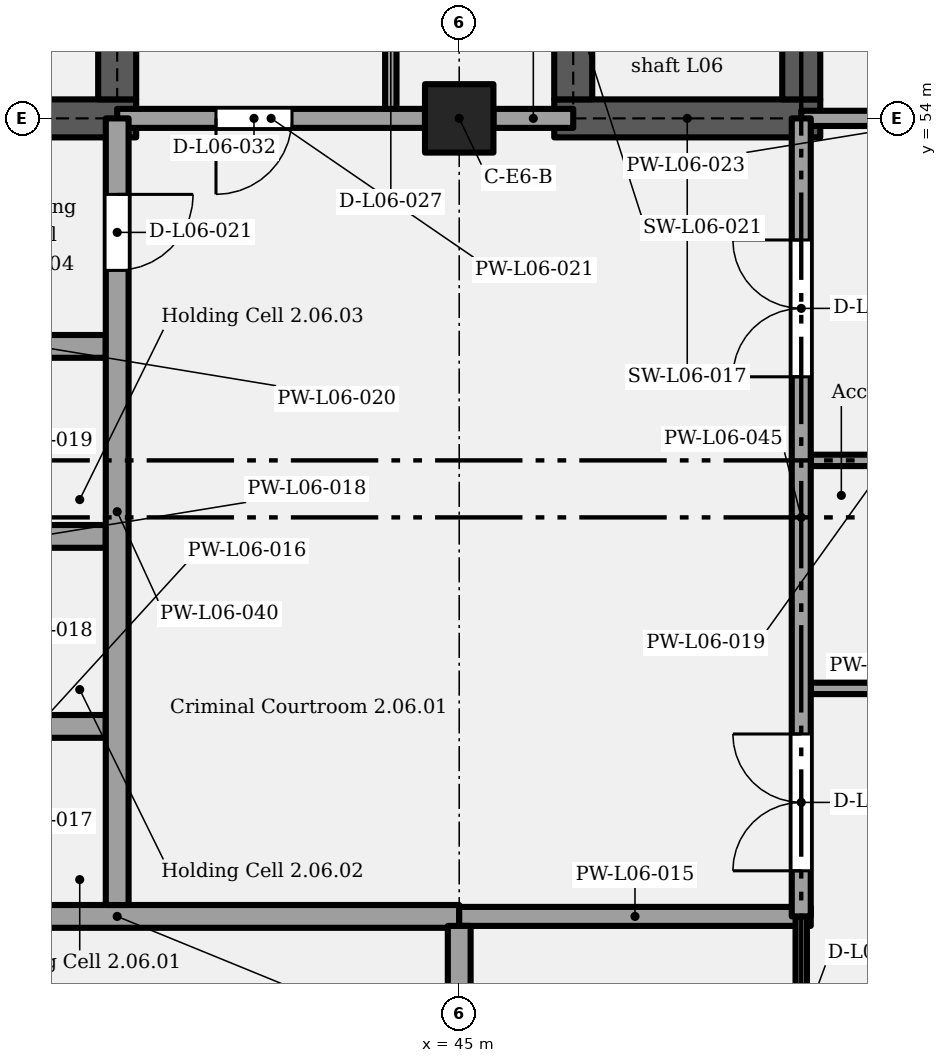
"""IFC4 building model, lengths in metres.
Left out: names, types, materials, properties, quantities, classifications, styles, units other than length and angle.
Written with IfcOpenShell. Run it as: python <this file> out.ifc"""

import sys

from ifc_helpers import new_model, si_unit, direction, frame, frame_2d, origin, origin_2d, place, context, subcontext, project, spatial, rectangle, extrude, element, fill, save


model = new_model("IFC4")
c1 = context("Model", 3, precision=1e-05, world=origin(), true_north=direction((0.0, 1.0)))
c2 = subcontext(c1, "Body", "Model", "MODEL_VIEW")
j1 = project(units=[si_unit("LENGTHUNIT", "METRE"), si_unit("PLANEANGLEUNIT", "RADIAN")], contexts=[c1])
p1 = place(None, origin())
s1 = spatial("IfcSite", under=j1, at=p1, CompositionType="ELEMENT")
p2 = place(p1, origin())
s2 = spatial("IfcBuilding", under=s1, at=p2, CompositionType="ELEMENT")
p3 = place(p2, frame((0.0, 0.0, 33.6)))
s3 = spatial("IfcBuildingStorey", under=s2, at=p3, CompositionType="ELEMENT", Elevation=33.6)
p4 = place(p3, frame((45.0, 54.0, 0.0), z_axis=(0.0, 0.0, 1.0), x_axis=(1.0, 0.0, 0.0)))
e1 = element("IfcColumn", 1, at=p4, inside=s3, PredefinedType="COLUMN", context=c2, shape_type="SweptSolid", body=[
    extrude(rectangle(XDim=0.9, YDim=0.9, at=origin_2d()), origin(), (0.0, 0.0, 1.0), 5.4),
])
p5 = place(p3, frame((38.15, 54.0, 0.0), z_axis=(0.0, 0.0, 1.0), x_axis=(1.0, 0.0, 0.0)))
e2 = element("IfcWall", 2, at=p5, inside=s3, PredefinedType="SHEAR", context=c2, shape_type="SweptSolid", body=[
    extrude(rectangle(XDim=2.6, YDim=0.5, at=frame_2d((1.3, 0.0))), origin(), (0.0, 0.0, 1.0), 5.15),
])
p6 = place(p3, frame((46.25, 54.0, 0.0), z_axis=(0.0, 0.0, 1.0), x_axis=(1.0, 0.0, 0.0)))
e3 = element("IfcWall", 3, at=p6, inside=s3, PredefinedType="SHEAR", context=c2, shape_type="SweptSolid", body=[
    extrude(rectangle(XDim=3.5, YDim=0.5, at=frame_2d((1.75, 0.0))), origin(), (0.0, 0.0, 1.0), 5.15),
])
p7 = place(p3, frame((40.5, 54.25, 0.0), z_axis=(0.0, 0.0, 1.0), x_axis=(0.0, 1.0, 0.0)))
e4 = element("IfcWall", 4, at=p7, inside=s3, PredefinedType="SHEAR", context=c2, shape_type="SweptSolid", body=[
    extrude(rectangle(XDim=11.5, YDim=0.5, at=frame_2d((5.75, 0.0))), origin(), (0.0, 0.0, 1.0), 5.15),
])
p8 = place(p3, frame((46.5, 54.25, 0.0), z_axis=(0.0, 0.0, 1.0), x_axis=(0.0, 1.0, 0.0)))
e5 = element("IfcWall", 5, at=p8, inside=s3, PredefinedType="SHEAR", context=c2, shape_type="SweptSolid", body=[
    extrude(rectangle(XDim=2.5, YDim=0.5, at=frame_2d((1.25, 0.0))), origin(), (0.0, 0.0, 1.0), 5.15),
])
p9 = place(p3, frame((49.5, 54.25, 0.0), z_axis=(0.0, 0.0, 1.0), x_axis=(0.0, 1.0, 0.0)))
e6 = element("IfcWall", 6, at=p9, inside=s3, PredefinedType="SHEAR", context=c2, shape_type="SweptSolid", body=[
    extrude(rectangle(XDim=11.5, YDim=0.5, at=frame_2d((5.75, 0.0))), origin(), (0.0, 0.0, 1.0), 5.15),
])
p10 = place(p9, frame((0.7, 0.0, 0.0)))
e7 = element("IfcOpeningElement", 7, at=p10, cuts=e6, PredefinedType="OPENING", context=c2, shape_type="SweptSolid", body=[
    extrude(rectangle(XDim=1.1, YDim=2.1, at=frame_2d((0.55, 1.05))), frame((0.0, 0.26, 0.0), z_axis=(0.0, -1.0, 0.0), x_axis=(1.0, 0.0, 0.0)), (0.0, 0.0, 1.0), 0.52),
])
p11 = place(p9, frame((4.35, 0.0, 0.0), z_axis=(0.0, 0.0, 1.0), x_axis=(-1.0, 0.0, 0.0)))
e8 = element("IfcOpeningElement", 8, at=p11, cuts=e6, PredefinedType="OPENING", context=c2, shape_type="SweptSolid", body=[
    extrude(rectangle(XDim=1.2, YDim=2.1, at=frame_2d((0.6, 1.05))), frame((0.0, 0.26, 0.0), z_axis=(0.0, -1.0, 0.0), x_axis=(1.0, 0.0, 0.0)), (0.0, 0.0, 1.0), 0.52),
])
p12 = place(p3, frame((36.0, 43.5, 0.0), z_axis=(0.0, 0.0, 1.0), x_axis=(1.0, 0.0, 0.0)))
e9 = element("IfcWall", 9, at=p12, inside=s3, PredefinedType="PARTITIONING", context=c2, shape_type="SweptSolid", body=[
    extrude(rectangle(XDim=9.0, YDim=0.3, at=frame_2d((4.5, 0.0))), origin(), (0.0, 0.0, 1.0), 5.15),
])
p13 = place(p12, frame((1.35, 0.0, 0.0), z_axis=(0.0, 0.0, 1.0), x_axis=(-1.0, 0.0, 0.0)))
e10 = element("IfcOpeningElement", 10, at=p13, cuts=e9, PredefinedType="OPENING", context=c2, shape_type="SweptSolid", body=[
    extrude(rectangle(XDim=0.9, YDim=2.1, at=frame_2d((0.45, 1.05))), frame((0.0, 0.16, 0.0), z_axis=(0.0, -1.0, 0.0), x_axis=(1.0, 0.0, 0.0)), (0.0, 0.0, 1.0), 0.32),
])
p14 = place(p3, frame((45.0, 43.5, 0.0), z_axis=(0.0, 0.0, 1.0), x_axis=(1.0, 0.0, 0.0)))
e11 = element("IfcWall", 11, at=p14, inside=s3, PredefinedType="PARTITIONING", context=c2, shape_type="SweptSolid", body=[
    extrude(rectangle(XDim=4.625, YDim=0.25, at=frame_2d((2.312, 0.0))), origin(), (0.0, 0.0, 1.0), 5.15),
])
p15 = place(p3, frame((38.55, 46.0, 0.0), z_axis=(0.0, 0.0, 1.0), x_axis=(1.0, 0.0, 0.0)))
e12 = element("IfcWall", 12, at=p15, inside=s3, PredefinedType="PARTITIONING", context=c2, shape_type="SweptSolid", body=[
    extrude(rectangle(XDim=1.8, YDim=0.3, at=frame_2d((0.9, 0.0))), origin(), (0.0, 0.0, 1.0), 5.15),
])
p16 = place(p3, frame((49.625, 46.5, 0.0), z_axis=(0.0, 0.0, 1.0), x_axis=(1.0, 0.0, 0.0)))
e13 = element("IfcWall", 13, at=p16, inside=s3, PredefinedType="PARTITIONING", context=c2, shape_type="SweptSolid", body=[
    extrude(rectangle(XDim=2.05, YDim=0.15, at=frame_2d((1.025, 0.0))), origin(), (0.0, 0.0, 1.0), 5.15),
])
p17 = place(p3, frame((38.55, 48.5, 0.0), z_axis=(0.0, 0.0, 1.0), x_axis=(1.0, 0.0, 0.0)))
e14 = element("IfcWall", 14, at=p17, inside=s3, PredefinedType="PARTITIONING", context=c2, shape_type="SweptSolid", body=[
    extrude(rectangle(XDim=1.8, YDim=0.3, at=frame_2d((0.9, 0.0))), origin(), (0.0, 0.0, 1.0), 5.15),
])
p18 = place(p3, frame((49.625, 49.5, 0.0), z_axis=(0.0, 0.0, 1.0), x_axis=(1.0, 0.0, 0.0)))
e15 = element("IfcWall", 15, at=p18, inside=s3, PredefinedType="PARTITIONING", context=c2, shape_type="SweptSolid", body=[
    extrude(rectangle(XDim=2.05, YDim=0.15, at=frame_2d((1.025, 0.0))), origin(), (0.0, 0.0, 1.0), 5.15),
])
p19 = place(p3, frame((38.55, 51.0, 0.0), z_axis=(0.0, 0.0, 1.0), x_axis=(1.0, 0.0, 0.0)))
e16 = element("IfcWall", 16, at=p19, inside=s3, PredefinedType="PARTITIONING", context=c2, shape_type="SweptSolid", body=[
    extrude(rectangle(XDim=1.8, YDim=0.3, at=frame_2d((0.9, 0.0))), origin(), (0.0, 0.0, 1.0), 5.15),
])
p20 = place(p3, frame((40.5, 54.0, 0.0), z_axis=(0.0, 0.0, 1.0), x_axis=(1.0, 0.0, 0.0)))
e17 = element("IfcWall", 17, at=p20, inside=s3, PredefinedType="PARTITIONING", context=c2, shape_type="SweptSolid", body=[
    extrude(rectangle(XDim=4.05, YDim=0.25, at=frame_2d((2.025, 0.0))), origin(), (0.0, 0.0, 1.0), 4.4),
])
p21 = place(p20, frame((2.3, 0.0, 0.0), z_axis=(0.0, 0.0, 1.0), x_axis=(-1.0, 0.0, 0.0)))
e18 = element("IfcOpeningElement", 18, at=p21, cuts=e17, PredefinedType="OPENING", context=c2, shape_type="SweptSolid", body=[
    extrude(rectangle(XDim=1.0, YDim=2.1, at=frame_2d((0.5, 1.05))), frame((0.0, 0.135, 0.0), z_axis=(0.0, -1.0, 0.0), x_axis=(1.0, 0.0, 0.0)), (0.0, 0.0, 1.0), 0.27),
])
p22 = place(p3, frame((45.45, 54.0, 0.0), z_axis=(0.0, 0.0, 1.0), x_axis=(1.0, 0.0, 0.0)))
e19 = element("IfcWall", 19, at=p22, inside=s3, PredefinedType="PARTITIONING", context=c2, shape_type="SweptSolid", body=[
    extrude(rectangle(XDim=1.05, YDim=0.25, at=frame_2d((0.525, 0.0))), origin(), (0.0, 0.0, 1.0), 4.4),
])
p23 = place(p3, frame((49.5, 54.0, 0.0), z_axis=(0.0, 0.0, 1.0), x_axis=(1.0, 0.0, 0.0)))
e20 = element("IfcWall", 20, at=p23, inside=s3, PredefinedType="PARTITIONING", context=c2, shape_type="SweptSolid", body=[
    extrude(rectangle(XDim=4.05, YDim=0.2, at=frame_2d((2.025, 0.0))), origin(), (0.0, 0.0, 1.0), 4.4),
])
p24 = place(p23, frame((1.35, 0.0, 0.0)))
e21 = element("IfcOpeningElement", 21, at=p24, cuts=e20, PredefinedType="OPENING", context=c2, shape_type="SweptSolid", body=[
    extrude(rectangle(XDim=1.8, YDim=2.1, at=frame_2d((0.9, 1.05))), frame((0.0, 0.11, 0.0), z_axis=(0.0, -1.0, 0.0), x_axis=(1.0, 0.0, 0.0)), (0.0, 0.0, 1.0), 0.22),
])
p25 = place(p3, frame((40.5, 43.65, 0.0), z_axis=(0.0, 0.0, 1.0), x_axis=(0.0, 1.0, 0.0)))
e22 = element("IfcWall", 22, at=p25, inside=s3, PredefinedType="PARTITIONING", context=c2, shape_type="SweptSolid", body=[
    extrude(rectangle(XDim=10.35, YDim=0.3, at=frame_2d((5.175, 0.0))), origin(), (0.0, 0.0, 1.0), 5.15),
])
p26 = place(p25, frame((9.35, 0.0, 0.0), z_axis=(0.0, 0.0, 1.0), x_axis=(-1.0, 0.0, 0.0)))
e23 = element("IfcOpeningElement", 23, at=p26, cuts=e22, PredefinedType="OPENING", context=c2, shape_type="SweptSolid", body=[
    extrude(rectangle(XDim=1.0, YDim=2.0, at=frame_2d((0.5, 1.0))), frame((0.0, 0.16, 0.0), z_axis=(0.0, -1.0, 0.0), x_axis=(1.0, 0.0, 0.0)), (0.0, 0.0, 1.0), 0.32),
])
p27 = place(p3, frame((44.1, 54.125, 0.0), z_axis=(0.0, 0.0, 1.0), x_axis=(0.0, 1.0, 0.0)))
e24 = element("IfcWall", 24, at=p27, inside=s3, PredefinedType="PARTITIONING", context=c2, shape_type="SweptSolid", body=[
    extrude(rectangle(XDim=8.8, YDim=0.15, at=frame_2d((4.4, 0.0))), origin(), (0.0, 0.0, 1.0), 5.15),
])
p28 = place(p27, frame((0.875, 0.0, 0.0)))
e25 = element("IfcOpeningElement", 25, at=p28, cuts=e24, PredefinedType="OPENING", context=c2, shape_type="SweptSolid", body=[
    extrude(rectangle(XDim=1.0, YDim=2.1, at=frame_2d((0.5, 1.05))), frame((0.0, 0.085, 0.0), z_axis=(0.0, -1.0, 0.0), x_axis=(1.0, 0.0, 0.0)), (0.0, 0.0, 1.0), 0.17),
])
p29 = place(p27, frame((3.925, 0.0, 0.0)))
e26 = element("IfcOpeningElement", 26, at=p29, cuts=e24, PredefinedType="OPENING", context=c2, shape_type="SweptSolid", body=[
    extrude(rectangle(XDim=0.9, YDim=2.1, at=frame_2d((0.45, 1.05))), frame((0.0, 0.085, 0.0), z_axis=(0.0, -1.0, 0.0), x_axis=(1.0, 0.0, 0.0)), (0.0, 0.0, 1.0), 0.17),
])
p30 = place(p27, frame((6.925, 0.0, 0.0)))
e27 = element("IfcOpeningElement", 27, at=p30, cuts=e24, PredefinedType="OPENING", context=c2, shape_type="SweptSolid", body=[
    extrude(rectangle(XDim=0.9, YDim=2.1, at=frame_2d((0.45, 1.05))), frame((0.0, 0.085, 0.0), z_axis=(0.0, -1.0, 0.0), x_axis=(1.0, 0.0, 0.0)), (0.0, 0.0, 1.0), 0.17),
])
p31 = place(p3, frame((45.0, 37.95, 0.0), z_axis=(0.0, 0.0, 1.0), x_axis=(0.0, 1.0, 0.0)))
e28 = element("IfcWall", 28, at=p31, inside=s3, PredefinedType="PARTITIONING", context=c2, shape_type="SweptSolid", body=[
    extrude(rectangle(XDim=5.425, YDim=0.3, at=frame_2d((2.712, 0.0))), origin(), (0.0, 0.0, 1.0), 4.2),
])
p32 = place(p3, frame((49.5, 37.5, 0.0), z_axis=(0.0, 0.0, 1.0), x_axis=(0.0, 1.0, 0.0)))
e29 = element("IfcWall", 29, at=p32, inside=s3, PredefinedType="PARTITIONING", context=c2, shape_type="SweptSolid", body=[
    extrude(rectangle(XDim=6.0, YDim=0.15, at=frame_2d((3.0, 0.0))), origin(), (0.0, 0.0, 1.0), 5.15),
])
p33 = place(p32, frame((1.05, 0.0, 0.0)))
e30 = element("IfcOpeningElement", 30, at=p33, cuts=e29, PredefinedType="OPENING", context=c2, shape_type="SweptSolid", body=[
    extrude(rectangle(XDim=0.9, YDim=2.1, at=frame_2d((0.45, 1.05))), frame((0.0, 0.085, 0.0), z_axis=(0.0, -1.0, 0.0), x_axis=(1.0, 0.0, 0.0)), (0.0, 0.0, 1.0), 0.17),
])
p34 = place(p32, frame((4.05, 0.0, 0.0)))
e31 = element("IfcOpeningElement", 31, at=p34, cuts=e29, PredefinedType="OPENING", context=c2, shape_type="SweptSolid", body=[
    extrude(rectangle(XDim=0.9, YDim=2.1, at=frame_2d((0.45, 1.05))), frame((0.0, 0.085, 0.0), z_axis=(0.0, -1.0, 0.0), x_axis=(1.0, 0.0, 0.0)), (0.0, 0.0, 1.0), 0.17),
])
p35 = place(p3, frame((49.5, 43.5, 0.0), z_axis=(0.0, 0.0, 1.0), x_axis=(0.0, 1.0, 0.0)))
e32 = element("IfcWall", 32, at=p35, inside=s3, PredefinedType="PARTITIONING", context=c2, shape_type="SweptSolid", body=[
    extrude(rectangle(XDim=10.5, YDim=0.25, at=frame_2d((5.25, 0.0))), origin(), (0.0, 0.0, 1.0), 5.15),
])
p36 = place(p35, frame((0.6, 0.0, 0.0)))
e33 = element("IfcOpeningElement", 33, at=p36, cuts=e32, PredefinedType="OPENING", context=c2, shape_type="SweptSolid", body=[
    extrude(rectangle(XDim=1.8, YDim=2.4, at=frame_2d((0.9, 1.2))), frame((0.0, 0.135, 0.0), z_axis=(0.0, -1.0, 0.0), x_axis=(1.0, 0.0, 0.0)), (0.0, 0.0, 1.0), 0.27),
])
p37 = place(p35, frame((7.1, 0.0, 0.0)))
e34 = element("IfcOpeningElement", 34, at=p37, cuts=e32, PredefinedType="OPENING", context=c2, shape_type="SweptSolid", body=[
    extrude(rectangle(XDim=1.8, YDim=2.4, at=frame_2d((0.9, 1.2))), frame((0.0, 0.135, 0.0), z_axis=(0.0, -1.0, 0.0), x_axis=(1.0, 0.0, 0.0)), (0.0, 0.0, 1.0), 0.27),
])
p38 = place(p36, origin())
e35 = element("IfcDoor", 35, at=p38, inside=s3, OperationType="DOUBLE_DOOR_SINGLE_SWING", PredefinedType="DOOR", context=c2, shape_type="SweptSolid", body=[
    extrude(rectangle(XDim=1.8, YDim=2.4, at=frame_2d((0.9, 1.2))), frame((0.0, 0.025, 0.0), z_axis=(0.0, -1.0, 0.0), x_axis=(1.0, 0.0, 0.0)), (0.0, 0.0, 1.0), 0.05),
])
fill(e33, e35)
p39 = place(p37, origin())
e36 = element("IfcDoor", 36, at=p39, inside=s3, OperationType="DOUBLE_DOOR_SINGLE_SWING", PredefinedType="DOOR", context=c2, shape_type="SweptSolid", body=[
    extrude(rectangle(XDim=1.8, YDim=2.4, at=frame_2d((0.9, 1.2))), frame((0.0, 0.025, 0.0), z_axis=(0.0, -1.0, 0.0), x_axis=(1.0, 0.0, 0.0)), (0.0, 0.0, 1.0), 0.05),
])
fill(e34, e36)
p40 = place(p26, origin())
e37 = element("IfcDoor", 37, at=p40, inside=s3, OperationType="SINGLE_SWING_LEFT", PredefinedType="DOOR", context=c2, shape_type="SweptSolid", body=[
    extrude(rectangle(XDim=1.0, YDim=2.0, at=frame_2d((0.5, 1.0))), frame((0.0, 0.025, 0.0), z_axis=(0.0, -1.0, 0.0), x_axis=(1.0, 0.0, 0.0)), (0.0, 0.0, 1.0), 0.05),
])
fill(e23, e37)
p41 = place(p21, origin())
e38 = element("IfcDoor", 38, at=p41, inside=s3, OperationType="SINGLE_SWING_RIGHT", PredefinedType="DOOR", context=c2, shape_type="SweptSolid", body=[
    extrude(rectangle(XDim=1.0, YDim=2.1, at=frame_2d((0.5, 1.05))), frame((0.0, 0.025, 0.0), z_axis=(0.0, -1.0, 0.0), x_axis=(1.0, 0.0, 0.0)), (0.0, 0.0, 1.0), 0.05),
])
fill(e18, e38)
save(model, sys.argv[1])
